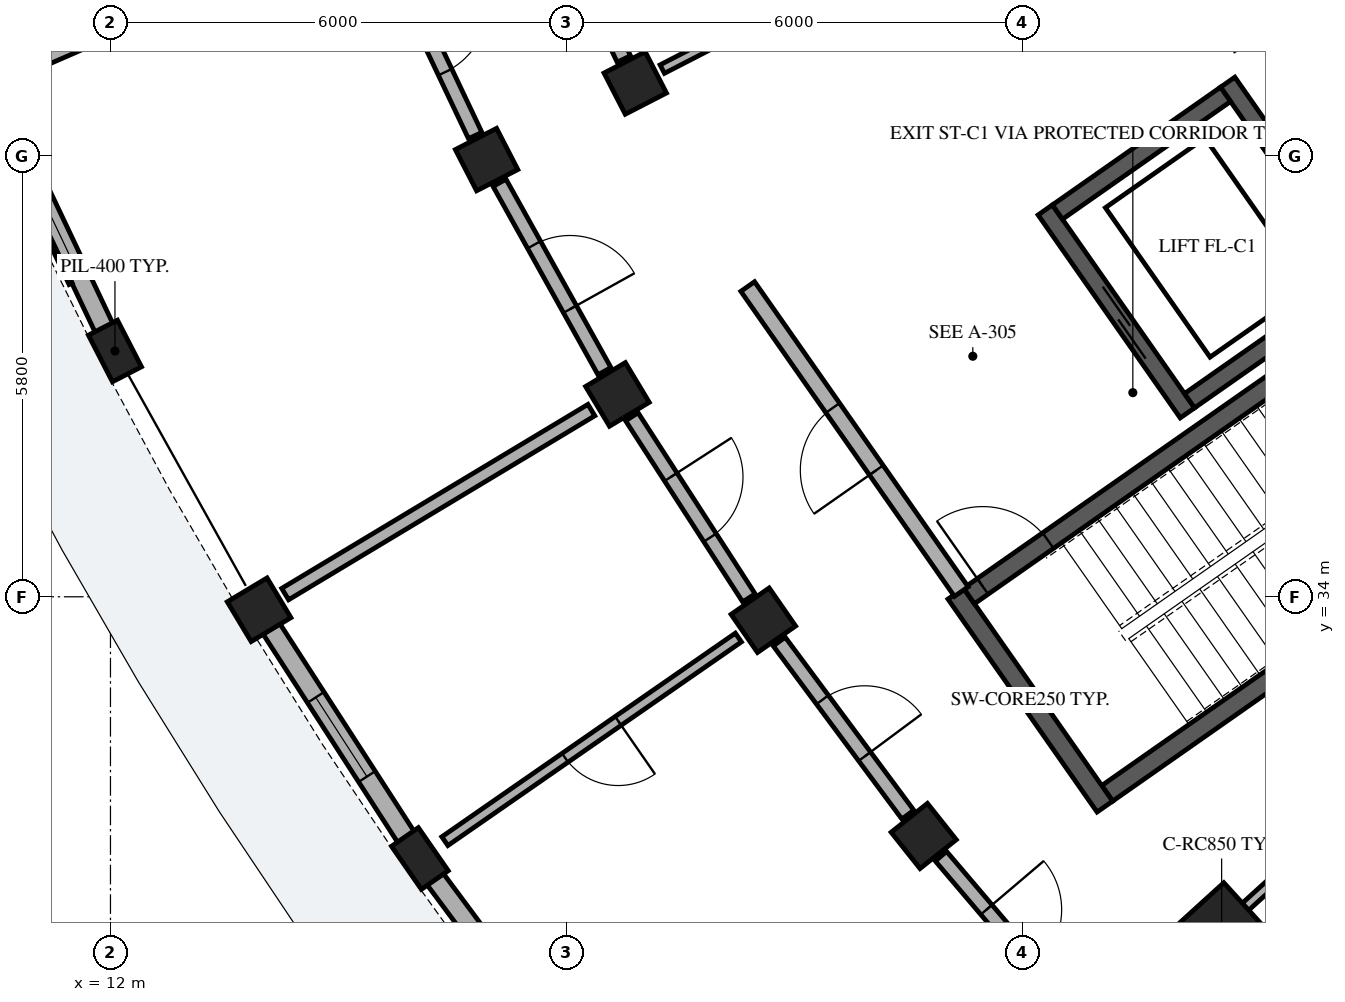
"""IFC4 building model, lengths in metres.
Left out: names, types, materials, properties, quantities, classifications, styles, units other than length and angle.
Written with IfcOpenShell. Run it as: python <this file> out.ifc"""

import sys

from ifc_helpers import new_model, si_unit, direction, frame, frame_2d, origin, origin_2d, place, context, subcontext, project, spatial, rectangle, extrude, element, fill, save


model = new_model("IFC4")
c1 = context("Model", 3, precision=1e-05, world=origin(), true_north=direction((0.0, 1.0)))
c2 = subcontext(c1, "Body", "Model", "MODEL_VIEW")
j1 = project(units=[si_unit("LENGTHUNIT", "METRE"), si_unit("PLANEANGLEUNIT", "RADIAN")], contexts=[c1])
p1 = place(None, origin())
s1 = spatial("IfcSite", under=j1, at=p1, CompositionType="ELEMENT")
p2 = place(p1, origin())
s2 = spatial("IfcBuilding", under=s1, at=p2, CompositionType="ELEMENT")
p3 = place(p2, origin())
s3 = spatial("IfcBuildingStorey", under=s2, at=p3, CompositionType="ELEMENT", Elevation=0.0)
p4 = place(p3, frame((25.114, 31.414, 0.0), z_axis=(0.0, 0.0, 1.0), x_axis=(0.819141541656, 0.573591435374, 0.0)))
e1 = element("IfcWall", 1, at=p4, inside=s3, PredefinedType="SHEAR", context=c2, shape_type="SweptSolid", body=[
    extrude(rectangle(XDim=6.6, YDim=0.25, at=frame_2d((3.3, 0.0))), origin(), (0.0, 0.0, 1.0), 4.48),
])
p5 = place(p3, frame((25.083, 31.24, 0.0), z_axis=(0.0, 0.0, 1.0), x_axis=(-0.573582112484, 0.819148069789, 0.0)))
e2 = element("IfcWall", 2, at=p5, inside=s3, PredefinedType="SHEAR", context=c2, shape_type="SweptSolid", body=[
    extrude(rectangle(XDim=3.42, YDim=0.25, at=frame_2d((1.71, 0.0))), origin(), (0.0, 0.0, 1.0), 4.48),
])
p6 = place(p3, frame((23.296, 34.01, 0.0), z_axis=(0.0, 0.0, 1.0), x_axis=(0.819153711596, 0.573574055182, 0.0)))
e3 = element("IfcWall", 3, at=p6, inside=s3, PredefinedType="SHEAR", context=c2, shape_type="SweptSolid", body=[
    extrude(rectangle(XDim=6.6, YDim=0.25, at=frame_2d((3.3, 0.0))), origin(), (0.0, 0.0, 1.0), 4.48),
])
p7 = place(p6, frame((0.22, 0.0, 0.0)))
e4 = element("IfcOpeningElement", 4, at=p7, cuts=e3, PredefinedType="OPENING", context=c2, shape_type="SweptSolid", body=[
    extrude(rectangle(XDim=1.05, YDim=2.15, at=frame_2d((0.525, 1.075))), frame((0.0, 0.135, 0.0), z_axis=(0.0, -1.0, 0.0), x_axis=(1.0, 0.0, 0.0)), (0.0, 0.0, 1.0), 0.27),
])
p8 = place(p3, frame((26.169, 36.419, 0.0), z_axis=(0.0, 0.0, 1.0), x_axis=(-0.573582966431, 0.819147471839, 0.0)))
e5 = element("IfcWall", 5, at=p8, inside=s3, PredefinedType="SHEAR", context=c2, shape_type="SweptSolid", body=[
    extrude(rectangle(XDim=3.26, YDim=0.23, at=frame_2d((1.63, 0.0))), origin(), (0.0, 0.0, 1.0), 4.48),
])
p9 = place(p8, frame((0.9, 0.0, 0.0)))
e6 = element("IfcOpeningElement", 6, at=p9, cuts=e5, PredefinedType="OPENING", context=c2, shape_type="SweptSolid", body=[
    extrude(rectangle(XDim=1.1, YDim=2.15, at=frame_2d((0.55, 1.075))), frame((0.0, 0.125, 0.0), z_axis=(0.0, -1.0, 0.0), x_axis=(1.0, 0.0, 0.0)), (0.0, 0.0, 1.0), 0.25),
])
p10 = place(p3, frame((28.569, 38.1, 0.0), z_axis=(0.0, 0.0, 1.0), x_axis=(-0.573582966431, 0.819147471839, 0.0)))
e7 = element("IfcWall", 7, at=p10, inside=s3, PredefinedType="SHEAR", context=c2, shape_type="SweptSolid", body=[
    extrude(rectangle(XDim=3.26, YDim=0.23, at=frame_2d((1.63, 0.0))), origin(), (0.0, 0.0, 1.0), 4.48),
])
p11 = place(p3, frame((26.197, 36.579, 0.0), z_axis=(0.0, 0.0, 1.0), x_axis=(0.819159695432, 0.573565509231, 0.0)))
e8 = element("IfcWall", 8, at=p11, inside=s3, PredefinedType="SHEAR", context=c2, shape_type="SweptSolid", body=[
    extrude(rectangle(XDim=2.7, YDim=0.23, at=frame_2d((1.35, 0.0))), origin(), (0.0, 0.0, 1.0), 4.48),
])
p12 = place(p3, frame((24.459, 39.061, 0.0), z_axis=(0.0, 0.0, 1.0), x_axis=(0.819189439894, 0.573523026186, 0.0)))
e9 = element("IfcWall", 9, at=p12, inside=s3, PredefinedType="SHEAR", context=c2, shape_type="SweptSolid", body=[
    extrude(rectangle(XDim=2.7, YDim=0.23, at=frame_2d((1.35, 0.0))), origin(), (0.0, 0.0, 1.0), 4.48),
])
for number, where, z_axis, x_axis in (
    (10, (18.905, 40.759, 0.0), (0.0, 0.0, 1.0), (-0.889, -0.458, 0.0)),
    (11, (16.949, 39.752, 0.0), (0.0, 0.0, 1.0), (-0.889, -0.458, 0.0)),
):
    element("IfcColumn", number, at=place(p3, frame(where, z_axis=z_axis, x_axis=x_axis)), inside=s3, PredefinedType="COLUMN", context=c2, shape_type="SweptSolid", body=[
        extrude(rectangle(XDim=0.61, YDim=0.61, at=origin_2d()), origin(), (0.0, 0.0, 1.0), 4.485),
    ])
p13 = place(p3, frame((12.059, 37.234, 0.0), z_axis=(0.0, 0.0, 1.0), x_axis=(-0.889017141486, -0.457873915117, 0.0)))
e12 = element("IfcColumn", 12, at=p13, inside=s3, PredefinedType="PILASTER", context=c2, shape_type="SweptSolid", body=[
    extrude(rectangle(XDim=0.43, YDim=0.69, at=origin_2d()), origin(), (0.0, 0.0, 1.0), 4.485),
])
for number, where, z_axis, x_axis in (
    (13, (18.67, 36.662, 0.0), (0.0, 0.0, 1.0), (-0.857, -0.515, 0.0)),
    (14, (13.956, 33.83, 0.0), (0.0, 0.0, 1.0), (-0.857, -0.515, 0.0)),
    (15, (20.59, 33.692, 0.0), (0.0, 0.0, 1.0), (-0.822, -0.57, 0.0)),
):
    element("IfcColumn", number, at=place(p3, frame(where, z_axis=z_axis, x_axis=x_axis)), inside=s3, PredefinedType="COLUMN", context=c2, shape_type="SweptSolid", body=[
        extrude(rectangle(XDim=0.61, YDim=0.61, at=origin_2d()), origin(), (0.0, 0.0, 1.0), 4.485),
    ])
p14 = place(p3, frame((16.071, 30.557, 0.0), z_axis=(0.0, 0.0, 1.0), x_axis=(-0.821646937942, -0.569996762596, 0.0)))
e16 = element("IfcColumn", 16, at=p14, inside=s3, PredefinedType="PILASTER", context=c2, shape_type="SweptSolid", body=[
    extrude(rectangle(XDim=0.43, YDim=0.69, at=origin_2d()), origin(), (0.0, 0.0, 1.0), 4.485),
])
p15 = place(p3, frame((22.7, 30.853, 0.0), z_axis=(0.0, 0.0, 1.0), x_axis=(-0.782608156852, -0.622514636638, 0.0)))
e17 = element("IfcColumn", 17, at=p15, inside=s3, PredefinedType="COLUMN", context=c2, shape_type="SweptSolid", body=[
    extrude(rectangle(XDim=0.61, YDim=0.61, at=origin_2d()), origin(), (0.0, 0.0, 1.0), 4.485),
])
p16 = place(p3, frame((26.62, 29.638, 0.0), z_axis=(0.0, 0.0, 1.0), x_axis=(-0.740218127487, -0.672366807435, 0.0)))
e18 = element("IfcColumn", 18, at=p16, inside=s3, PredefinedType="COLUMN", context=c2, shape_type="SweptSolid", body=[
    extrude(rectangle(XDim=0.85, YDim=0.85, at=origin_2d()), origin(), (0.0, 0.0, 1.0), 4.485),
])
p17 = place(p3, frame((10.507, 40.506, 0.0), z_axis=(0.0, 0.0, 1.0), x_axis=(0.428562647062, -0.903512068289, 0.0)))
e19 = element("IfcWall", 19, at=p17, inside=s3, PredefinedType="SOLIDWALL", context=c2, shape_type="SweptSolid", body=[
    extrude(rectangle(XDim=3.437, YDim=0.26, at=frame_2d((1.718, 0.0))), origin(), (0.0, 0.0, 1.0), 3.755),
])
p18 = place(p17, frame((1.078, 0.0, 0.55)))
e20 = element("IfcOpeningElement", 20, at=p18, cuts=e19, PredefinedType="OPENING", context=c2, shape_type="SweptSolid", body=[
    extrude(rectangle(XDim=1.28, YDim=1.52, at=frame_2d((0.64, 0.76))), frame((0.0, 0.14, 0.0), z_axis=(0.0, -1.0, 0.0), x_axis=(1.0, 0.0, 0.0)), (0.0, 0.0, 1.0), 0.28),
])
p19 = place(p3, frame((14.105, 33.599, 0.0), z_axis=(0.0, 0.0, 1.0), x_axis=(0.54279171039, -0.839867346152, 0.0)))
e21 = element("IfcWall", 21, at=p19, inside=s3, PredefinedType="SOLIDWALL", context=c2, shape_type="SweptSolid", body=[
    extrude(rectangle(XDim=3.437, YDim=0.26, at=frame_2d((1.718, 0.0))), origin(), (0.0, 0.0, 1.0), 3.755),
])
p20 = place(p19, frame((1.098, 0.0, 0.55)))
e22 = element("IfcOpeningElement", 22, at=p20, cuts=e21, PredefinedType="OPENING", context=c2, shape_type="SweptSolid", body=[
    extrude(rectangle(XDim=1.24, YDim=1.535, at=frame_2d((0.62, 0.768))), frame((0.0, 0.14, 0.0), z_axis=(0.0, -1.0, 0.0), x_axis=(1.0, 0.0, 0.0)), (0.0, 0.0, 1.0), 0.28),
])
p21 = place(p3, frame((16.181, 30.408, 0.0), z_axis=(0.0, 0.0, 1.0), x_axis=(0.596562008048, -0.802566988203, 0.0)))
e23 = element("IfcWall", 23, at=p21, inside=s3, PredefinedType="SOLIDWALL", context=c2, shape_type="SweptSolid", body=[
    extrude(rectangle(XDim=3.437, YDim=0.26, at=frame_2d((1.718, 0.0))), origin(), (0.0, 0.0, 1.0), 3.755),
])
p22 = place(p21, frame((1.038, 0.0, 0.55)))
e24 = element("IfcOpeningElement", 24, at=p22, cuts=e23, PredefinedType="OPENING", context=c2, shape_type="SweptSolid", body=[
    extrude(rectangle(XDim=1.36, YDim=1.61, at=frame_2d((0.68, 0.805))), frame((0.0, 0.14, 0.0), z_axis=(0.0, -1.0, 0.0), x_axis=(1.0, 0.0, 0.0)), (0.0, 0.0, 1.0), 0.28),
])
p23 = place(p3, frame((23.195, 34.068, 0.0), z_axis=(0.0, 0.0, 1.0), x_axis=(-0.573572687386, 0.819154669329, 0.0)))
e25 = element("IfcWall", 25, at=p23, inside=s3, PredefinedType="PARTITIONING", context=c2, shape_type="SweptSolid", body=[
    extrude(rectangle(XDim=4.9, YDim=0.22, at=frame_2d((2.45, 0.0))), origin(), (0.0, 0.0, 1.0), 3.74),
])
p24 = place(p23, frame((1.95, 0.0, 0.0)))
e26 = element("IfcOpeningElement", 26, at=p24, cuts=e25, PredefinedType="OPENING", context=c2, shape_type="SweptSolid", body=[
    extrude(rectangle(XDim=1.0, YDim=2.15, at=frame_2d((0.5, 1.075))), frame((0.0, 0.12, 0.0), z_axis=(0.0, -1.0, 0.0), x_axis=(1.0, 0.0, 0.0)), (0.0, 0.0, 1.0), 0.24),
])
p25 = place(p3, frame((15.066, 42.788, 0.0), z_axis=(0.0, 0.0, 1.0), x_axis=(-0.917071707884, -0.398722312643, 0.0)))
e27 = element("IfcWall", 27, at=p25, inside=s3, PredefinedType="PARTITIONING", context=c2, shape_type="SweptSolid", body=[
    extrude(rectangle(XDim=4.7, YDim=0.175, at=frame_2d((2.35, 0.0))), origin(), (0.0, 0.0, 1.0), 3.1),
])
p26 = place(p3, frame((15.583, 42.631, 0.0), z_axis=(0.0, 0.0, 1.0), x_axis=(0.428493237107, -0.903544988229, 0.0)))
e28 = element("IfcWall", 28, at=p26, inside=s3, PredefinedType="PARTITIONING", context=c2, shape_type="SweptSolid", body=[
    extrude(rectangle(XDim=2.837, YDim=0.195, at=frame_2d((1.418, 0.0))), origin(), (0.0, 0.0, 1.0), 3.1),
])
p27 = place(p26, frame((0.924, 0.0, 0.0)))
e29 = element("IfcOpeningElement", 29, at=p27, cuts=e28, PredefinedType="OPENING", context=c2, shape_type="SweptSolid", body=[
    extrude(rectangle(XDim=0.99, YDim=2.16, at=frame_2d((0.495, 1.08))), frame((0.0, 0.107, 0.0), z_axis=(0.0, -1.0, 0.0), x_axis=(1.0, 0.0, 0.0)), (0.0, 0.0, 1.0), 0.215),
])
p28 = place(p3, frame((17.6, 43.509, 0.0), z_axis=(0.0, 0.0, 1.0), x_axis=(0.428550049392, -0.903518043631, 0.0)))
e30 = element("IfcWall", 30, at=p28, inside=s3, PredefinedType="PARTITIONING", context=c2, shape_type="SweptSolid", body=[
    extrude(rectangle(XDim=2.693, YDim=0.195, at=frame_2d((1.346, 0.0))), origin(), (0.0, 0.0, 1.0), 3.1),
])
p29 = place(p28, frame((0.852, 0.0, 0.0)))
e31 = element("IfcOpeningElement", 31, at=p29, cuts=e30, PredefinedType="OPENING", context=c2, shape_type="SweptSolid", body=[
    extrude(rectangle(XDim=0.99, YDim=2.16, at=frame_2d((0.495, 1.08))), frame((0.0, 0.107, 0.0), z_axis=(0.0, -1.0, 0.0), x_axis=(1.0, 0.0, 0.0)), (0.0, 0.0, 1.0), 0.215),
])
p30 = place(p3, frame((25.128, 43.964, 0.0), z_axis=(0.0, 0.0, 1.0), x_axis=(-0.889022010753, -0.457864460727, 0.0)))
e32 = element("IfcWall", 32, at=p30, inside=s3, PredefinedType="PARTITIONING", context=c2, shape_type="SweptSolid", body=[
    extrude(rectangle(XDim=6.6, YDim=0.125, at=frame_2d((3.3, 0.0))), origin(), (0.0, 0.0, 1.0), 3.1),
])
p31 = place(p30, frame((2.845, 0.0, 0.0)))
e33 = element("IfcOpeningElement", 33, at=p31, cuts=e32, PredefinedType="OPENING", context=c2, shape_type="SweptSolid", body=[
    extrude(rectangle(XDim=0.91, YDim=2.1, at=frame_2d((0.455, 1.05))), frame((0.0, 0.073, 0.0), z_axis=(0.0, -1.0, 0.0), x_axis=(1.0, 0.0, 0.0)), (0.0, 0.0, 1.0), 0.145),
])
p32 = place(p3, frame((17.119, 39.446, 0.0), z_axis=(0.0, 0.0, 1.0), x_axis=(0.48673124079, -0.8735517725, 0.0)))
e34 = element("IfcWall", 34, at=p32, inside=s3, PredefinedType="PARTITIONING", context=c2, shape_type="SweptSolid", body=[
    extrude(rectangle(XDim=2.837, YDim=0.195, at=frame_2d((1.418, 0.0))), origin(), (0.0, 0.0, 1.0), 3.1),
])
p33 = place(p32, frame((0.934, 0.0, 0.0)))
e35 = element("IfcOpeningElement", 35, at=p33, cuts=e34, PredefinedType="OPENING", context=c2, shape_type="SweptSolid", body=[
    extrude(rectangle(XDim=0.97, YDim=2.15, at=frame_2d((0.485, 1.075))), frame((0.0, 0.107, 0.0), z_axis=(0.0, -1.0, 0.0), x_axis=(1.0, 0.0, 0.0)), (0.0, 0.0, 1.0), 0.215),
])
p34 = place(p3, frame((18.327, 36.456, 0.0), z_axis=(0.0, 0.0, 1.0), x_axis=(-0.857139805444, -0.515083831937, 0.0)))
e36 = element("IfcWall", 36, at=p34, inside=s3, PredefinedType="PARTITIONING", context=c2, shape_type="SweptSolid", body=[
    extrude(rectangle(XDim=4.7, YDim=0.175, at=frame_2d((2.35, 0.0))), origin(), (0.0, 0.0, 1.0), 3.1),
])
p35 = place(p3, frame((18.86, 36.368, 0.0), z_axis=(0.0, 0.0, 1.0), x_axis=(0.542787304957, -0.83987019329, 0.0)))
e37 = element("IfcWall", 37, at=p35, inside=s3, PredefinedType="PARTITIONING", context=c2, shape_type="SweptSolid", body=[
    extrude(rectangle(XDim=2.837, YDim=0.195, at=frame_2d((1.418, 0.0))), origin(), (0.0, 0.0, 1.0), 3.1),
])
p36 = place(p35, frame((0.944, 0.0, 0.0)))
e38 = element("IfcOpeningElement", 38, at=p36, cuts=e37, PredefinedType="OPENING", context=c2, shape_type="SweptSolid", body=[
    extrude(rectangle(XDim=0.95, YDim=2.13, at=frame_2d((0.475, 1.065))), frame((0.0, 0.107, 0.0), z_axis=(0.0, -1.0, 0.0), x_axis=(1.0, 0.0, 0.0)), (0.0, 0.0, 1.0), 0.215),
])
p37 = place(p3, frame((20.261, 33.464, 0.0), z_axis=(0.0, 0.0, 1.0), x_axis=(-0.821638260647, -0.570009270663, 0.0)))
e39 = element("IfcWall", 39, at=p37, inside=s3, PredefinedType="PLUMBINGWALL", context=c2, shape_type="SweptSolid", body=[
    extrude(rectangle(XDim=4.7, YDim=0.14, at=frame_2d((2.35, 0.0))), origin(), (0.0, 0.0, 1.0), 3.1),
])
p38 = place(p37, frame((1.925, 0.0, 0.0)))
e40 = element("IfcOpeningElement", 40, at=p38, cuts=e39, PredefinedType="OPENING", context=c2, shape_type="SweptSolid", body=[
    extrude(rectangle(XDim=0.85, YDim=2.05, at=frame_2d((0.425, 1.025))), frame((0.0, 0.08, 0.0), z_axis=(0.0, -1.0, 0.0), x_axis=(1.0, 0.0, 0.0)), (0.0, 0.0, 1.0), 0.16),
])
p39 = place(p3, frame((20.799, 33.411, 0.0), z_axis=(0.0, 0.0, 1.0), x_axis=(0.596552136601, -0.802574325727, 0.0)))
e41 = element("IfcWall", 41, at=p39, inside=s3, PredefinedType="PARTITIONING", context=c2, shape_type="SweptSolid", body=[
    extrude(rectangle(XDim=2.837, YDim=0.195, at=frame_2d((1.418, 0.0))), origin(), (0.0, 0.0, 1.0), 3.1),
])
p40 = place(p39, frame((0.954, 0.0, 0.0)))
e42 = element("IfcOpeningElement", 42, at=p40, cuts=e41, PredefinedType="OPENING", context=c2, shape_type="SweptSolid", body=[
    extrude(rectangle(XDim=0.93, YDim=2.12, at=frame_2d((0.465, 1.06))), frame((0.0, 0.107, 0.0), z_axis=(0.0, -1.0, 0.0), x_axis=(1.0, 0.0, 0.0)), (0.0, 0.0, 1.0), 0.215),
])
p41 = place(p3, frame((22.927, 30.586, 0.0), z_axis=(0.0, 0.0, 1.0), x_axis=(0.64778830669, -0.761820392032, 0.0)))
e43 = element("IfcWall", 43, at=p41, inside=s3, PredefinedType="PARTITIONING", context=c2, shape_type="SweptSolid", body=[
    extrude(rectangle(XDim=2.837, YDim=0.195, at=frame_2d((1.418, 0.0))), origin(), (0.0, 0.0, 1.0), 3.1),
])
p42 = place(p41, frame((0.924, 0.0, 0.0)))
e44 = element("IfcOpeningElement", 44, at=p42, cuts=e43, PredefinedType="OPENING", context=c2, shape_type="SweptSolid", body=[
    extrude(rectangle(XDim=0.99, YDim=2.16, at=frame_2d((0.495, 1.08))), frame((0.0, 0.107, 0.0), z_axis=(0.0, -1.0, 0.0), x_axis=(1.0, 0.0, 0.0)), (0.0, 0.0, 1.0), 0.215),
])
p43 = place(p3, frame((31.801, 34.344, 0.0), z_axis=(0.0, 0.0, 1.0), x_axis=(-0.74023124711, -0.672352363573, 0.0)))
e45 = element("IfcWall", 45, at=p43, inside=s3, PredefinedType="PARTITIONING", context=c2, shape_type="SweptSolid", body=[
    extrude(rectangle(XDim=6.6, YDim=0.125, at=frame_2d((3.3, 0.0))), origin(), (0.0, 0.0, 1.0), 3.1),
])
p44 = place(p43, frame((2.855, 0.0, 0.0)))
e46 = element("IfcOpeningElement", 46, at=p44, cuts=e45, PredefinedType="OPENING", context=c2, shape_type="SweptSolid", body=[
    extrude(rectangle(XDim=0.89, YDim=2.1, at=frame_2d((0.445, 1.05))), frame((0.0, 0.073, 0.0), z_axis=(0.0, -1.0, 0.0), x_axis=(1.0, 0.0, 0.0)), (0.0, 0.0, 1.0), 0.145),
])
p45 = place(p18, origin())
e47 = element("IfcWindow", 47, at=p45, inside=s3, PartitioningType="SINGLE_PANEL", PredefinedType="WINDOW", context=c2, shape_type="SweptSolid", body=[
    extrude(rectangle(XDim=1.28, YDim=1.52, at=frame_2d((0.64, 0.76))), frame((0.0, 0.03, 0.0), z_axis=(0.0, -1.0, 0.0), x_axis=(1.0, 0.0, 0.0)), (0.0, 0.0, 1.0), 0.06),
])
fill(e20, e47)
p46 = place(p20, origin())
e48 = element("IfcWindow", 48, at=p46, inside=s3, PartitioningType="SINGLE_PANEL", PredefinedType="WINDOW", context=c2, shape_type="SweptSolid", body=[
    extrude(rectangle(XDim=1.24, YDim=1.535, at=frame_2d((0.62, 0.768))), frame((0.0, 0.03, 0.0), z_axis=(0.0, -1.0, 0.0), x_axis=(1.0, 0.0, 0.0)), (0.0, 0.0, 1.0), 0.06),
])
fill(e22, e48)
p47 = place(p7, origin())
e49 = element("IfcDoor", 49, at=p47, inside=s3, OperationType="SINGLE_SWING_LEFT", PredefinedType="DOOR", context=c2, shape_type="SweptSolid", body=[
    extrude(rectangle(XDim=1.05, YDim=2.15, at=frame_2d((0.525, 1.075))), frame((0.0, 0.025, 0.0), z_axis=(0.0, -1.0, 0.0), x_axis=(1.0, 0.0, 0.0)), (0.0, 0.0, 1.0), 0.05),
])
fill(e4, e49)
p48 = place(p9, origin())
e50 = element("IfcDoor", 50, at=p48, inside=s3, OperationType="DOUBLE_DOOR_SLIDING", PredefinedType="DOOR", context=c2, shape_type="SweptSolid", body=[
    extrude(rectangle(XDim=1.1, YDim=2.15, at=frame_2d((0.55, 1.075))), frame((0.0, 0.025, 0.0), z_axis=(0.0, -1.0, 0.0), x_axis=(1.0, 0.0, 0.0)), (0.0, 0.0, 1.0), 0.05),
])
fill(e6, e50)
p49 = place(p24, origin())
e51 = element("IfcDoor", 51, at=p49, inside=s3, OperationType="SINGLE_SWING_LEFT", PredefinedType="DOOR", context=c2, shape_type="SweptSolid", body=[
    extrude(rectangle(XDim=1.0, YDim=2.15, at=frame_2d((0.5, 1.075))), frame((0.0, 0.025, 0.0), z_axis=(0.0, -1.0, 0.0), x_axis=(1.0, 0.0, 0.0)), (0.0, 0.0, 1.0), 0.05),
])
fill(e26, e51)
p50 = place(p27, origin())
e52 = element("IfcDoor", 52, at=p50, inside=s3, OperationType="SINGLE_SWING_LEFT", PredefinedType="DOOR", context=c2, shape_type="SweptSolid", body=[
    extrude(rectangle(XDim=0.99, YDim=2.16, at=frame_2d((0.495, 1.08))), frame((0.0, 0.025, 0.0), z_axis=(0.0, -1.0, 0.0), x_axis=(1.0, 0.0, 0.0)), (0.0, 0.0, 1.0), 0.05),
])
fill(e29, e52)
p51 = place(p33, origin())
e53 = element("IfcDoor", 53, at=p51, inside=s3, OperationType="SINGLE_SWING_RIGHT", PredefinedType="DOOR", context=c2, shape_type="SweptSolid", body=[
    extrude(rectangle(XDim=0.97, YDim=2.15, at=frame_2d((0.485, 1.075))), frame((0.0, 0.025, 0.0), z_axis=(0.0, -1.0, 0.0), x_axis=(1.0, 0.0, 0.0)), (0.0, 0.0, 1.0), 0.05),
])
fill(e35, e53)
p52 = place(p36, origin())
e54 = element("IfcDoor", 54, at=p52, inside=s3, OperationType="SINGLE_SWING_LEFT", PredefinedType="DOOR", context=c2, shape_type="SweptSolid", body=[
    extrude(rectangle(XDim=0.95, YDim=2.13, at=frame_2d((0.475, 1.065))), frame((0.0, 0.025, 0.0), z_axis=(0.0, -1.0, 0.0), x_axis=(1.0, 0.0, 0.0)), (0.0, 0.0, 1.0), 0.05),
])
fill(e38, e54)
p53 = place(p38, origin())
e55 = element("IfcDoor", 55, at=p53, inside=s3, OperationType="SINGLE_SWING_LEFT", PredefinedType="DOOR", context=c2, shape_type="SweptSolid", body=[
    extrude(rectangle(XDim=0.85, YDim=2.05, at=frame_2d((0.425, 1.025))), frame((0.0, 0.025, 0.0), z_axis=(0.0, -1.0, 0.0), x_axis=(1.0, 0.0, 0.0)), (0.0, 0.0, 1.0), 0.05),
])
fill(e40, e55)
p54 = place(p40, origin())
e56 = element("IfcDoor", 56, at=p54, inside=s3, OperationType="SINGLE_SWING_RIGHT", PredefinedType="DOOR", context=c2, shape_type="SweptSolid", body=[
    extrude(rectangle(XDim=0.93, YDim=2.12, at=frame_2d((0.465, 1.06))), frame((0.0, 0.025, 0.0), z_axis=(0.0, -1.0, 0.0), x_axis=(1.0, 0.0, 0.0)), (0.0, 0.0, 1.0), 0.05),
])
fill(e42, e56)
p55 = place(p42, origin())
e57 = element("IfcDoor", 57, at=p55, inside=s3, OperationType="SINGLE_SWING_LEFT", PredefinedType="DOOR", context=c2, shape_type="SweptSolid", body=[
    extrude(rectangle(XDim=0.99, YDim=2.16, at=frame_2d((0.495, 1.08))), frame((0.0, 0.025, 0.0), z_axis=(0.0, -1.0, 0.0), x_axis=(1.0, 0.0, 0.0)), (0.0, 0.0, 1.0), 0.05),
])
fill(e44, e57)
save(model, sys.argv[1])
